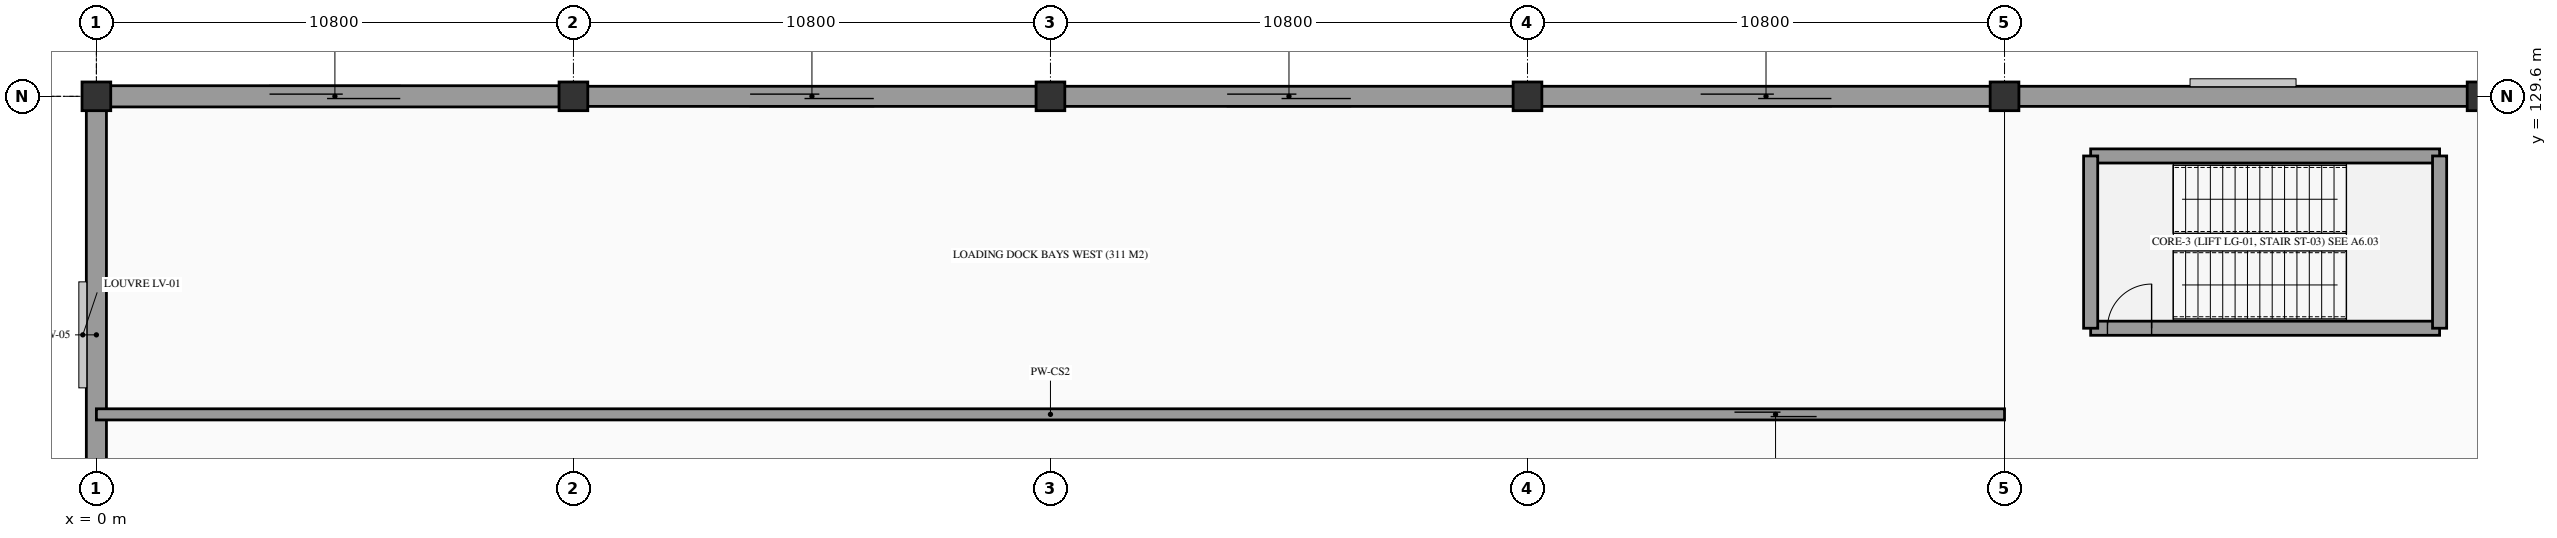
"""IFC4 building model, lengths in metres.
Left out: names, types, materials, properties, quantities, classifications, styles, units other than length and angle.
Written with IfcOpenShell. Run it as: python <this file> out.ifc"""

import sys

from ifc_helpers import new_model, si_unit, direction, frame, frame_2d, origin, origin_2d, place, context, subcontext, project, spatial, rectangle, extrude, element, fill, save


model = new_model("IFC4")
c1 = context("Model", 3, precision=1e-05, world=origin(), true_north=direction((0.0, 1.0)))
c2 = subcontext(c1, "Body", "Model", "MODEL_VIEW")
j1 = project(units=[si_unit("LENGTHUNIT", "METRE"), si_unit("PLANEANGLEUNIT", "RADIAN")], contexts=[c1])
p1 = place(None, origin())
s1 = spatial("IfcSite", under=j1, at=p1, CompositionType="ELEMENT")
p2 = place(p1, origin())
s2 = spatial("IfcBuilding", under=s1, at=p2, CompositionType="ELEMENT")
p3 = place(p2, origin())
s3 = spatial("IfcBuildingStorey", under=s2, at=p3, CompositionType="ELEMENT", Elevation=0.0)
for number, where, z_axis, x_axis in (
    (1, (0.0, 129.6, -1.2), (0.0, 0.0, 1.0), (1.0, 0.0, 0.0)),
    (2, (10.8, 129.6, -1.2), (0.0, 0.0, 1.0), (1.0, 0.0, 0.0)),
    (3, (21.6, 129.6, -1.2), (0.0, 0.0, 1.0), (1.0, 0.0, 0.0)),
    (4, (32.4, 129.6, -1.2), (0.0, 0.0, 1.0), (1.0, 0.0, 0.0)),
    (5, (43.2, 129.6, -1.2), (0.0, 0.0, 1.0), (1.0, 0.0, 0.0)),
    (6, (54.0, 129.6, -1.2), (0.0, 0.0, 1.0), (1.0, 0.0, 0.0)),
):
    element("IfcColumn", number, at=place(p3, frame(where, z_axis=z_axis, x_axis=x_axis)), inside=s3, PredefinedType="COLUMN", context=c2, shape_type="SweptSolid", body=[
        extrude(rectangle(XDim=0.65, YDim=0.65, at=origin_2d()), origin(), (0.0, 0.0, 1.0), 6.6),
    ])
p4 = place(p3, frame((0.0, 0.45, -1.2), z_axis=(0.0, 0.0, 1.0), x_axis=(0.0, 1.0, 0.0)))
e7 = element("IfcWall", 7, at=p4, inside=s3, PredefinedType="USERDEFINED", context=c2, shape_type="SweptSolid", body=[
    extrude(rectangle(XDim=128.7, YDim=0.374, at=frame_2d((64.35, 0.0))), origin(), (0.0, 0.0, 1.0), 0.14),
])
p5 = place(p3, frame((0.32, 129.6, 0.0), z_axis=(0.0, 0.0, 1.0), x_axis=(1.0, 0.0, 0.0)))
e8 = element("IfcWall", 8, at=p5, inside=s3, PredefinedType="STANDARD", context=c2, shape_type="SweptSolid", body=[
    extrude(rectangle(XDim=10.16, YDim=0.48, at=frame_2d((5.08, 0.0))), origin(), (0.0, 0.0, 1.0), 4.25),
])
p6 = place(p5, frame((3.6, 0.0, 0.0)))
e9 = element("IfcOpeningElement", 9, at=p6, cuts=e8, PredefinedType="OPENING", context=c2, shape_type="SweptSolid", body=[
    extrude(rectangle(XDim=2.96, YDim=3.35, at=frame_2d((1.48, 1.675))), frame((0.0, 0.25, 0.0), z_axis=(0.0, -1.0, 0.0), x_axis=(1.0, 0.0, 0.0)), (0.0, 0.0, 1.0), 0.5),
])
p7 = place(p3, frame((0.0, 119.12, 0.0), z_axis=(0.0, 0.0, 1.0), x_axis=(0.0, 1.0, 0.0)))
e10 = element("IfcWall", 10, at=p7, inside=s3, PredefinedType="STANDARD", context=c2, shape_type="SweptSolid", body=[
    extrude(rectangle(XDim=10.16, YDim=0.455, at=frame_2d((5.08, 0.0))), origin(), (0.0, 0.0, 1.0), 4.25),
])
p8 = place(p3, frame((11.12, 129.6, 0.0), z_axis=(0.0, 0.0, 1.0), x_axis=(1.0, 0.0, 0.0)))
e11 = element("IfcWall", 11, at=p8, inside=s3, PredefinedType="STANDARD", context=c2, shape_type="SweptSolid", body=[
    extrude(rectangle(XDim=10.16, YDim=0.455, at=frame_2d((5.08, 0.0))), origin(), (0.0, 0.0, 1.0), 4.25),
])
p9 = place(p8, frame((3.68, 0.0, 0.0)))
e12 = element("IfcOpeningElement", 12, at=p9, cuts=e11, PredefinedType="OPENING", context=c2, shape_type="SweptSolid", body=[
    extrude(rectangle(XDim=2.8, YDim=3.2, at=frame_2d((1.4, 1.6))), frame((0.0, 0.238, 0.0), z_axis=(0.0, -1.0, 0.0), x_axis=(1.0, 0.0, 0.0)), (0.0, 0.0, 1.0), 0.475),
])
p10 = place(p3, frame((21.92, 129.6, 0.0), z_axis=(0.0, 0.0, 1.0), x_axis=(1.0, 0.0, 0.0)))
e13 = element("IfcWall", 13, at=p10, inside=s3, PredefinedType="STANDARD", context=c2, shape_type="SweptSolid", body=[
    extrude(rectangle(XDim=10.16, YDim=0.455, at=frame_2d((5.08, 0.0))), origin(), (0.0, 0.0, 1.0), 4.25),
])
p11 = place(p10, frame((3.68, 0.0, 0.0)))
e14 = element("IfcOpeningElement", 14, at=p11, cuts=e13, PredefinedType="OPENING", context=c2, shape_type="SweptSolid", body=[
    extrude(rectangle(XDim=2.8, YDim=3.2, at=frame_2d((1.4, 1.6))), frame((0.0, 0.238, 0.0), z_axis=(0.0, -1.0, 0.0), x_axis=(1.0, 0.0, 0.0)), (0.0, 0.0, 1.0), 0.475),
])
p12 = place(p3, frame((32.72, 129.6, 0.0), z_axis=(0.0, 0.0, 1.0), x_axis=(1.0, 0.0, 0.0)))
e15 = element("IfcWall", 15, at=p12, inside=s3, PredefinedType="STANDARD", context=c2, shape_type="SweptSolid", body=[
    extrude(rectangle(XDim=10.16, YDim=0.455, at=frame_2d((5.08, 0.0))), origin(), (0.0, 0.0, 1.0), 4.25),
])
p13 = place(p12, frame((3.6, 0.0, 0.0)))
e16 = element("IfcOpeningElement", 16, at=p13, cuts=e15, PredefinedType="OPENING", context=c2, shape_type="SweptSolid", body=[
    extrude(rectangle(XDim=2.96, YDim=3.35, at=frame_2d((1.48, 1.675))), frame((0.0, 0.238, 0.0), z_axis=(0.0, -1.0, 0.0), x_axis=(1.0, 0.0, 0.0)), (0.0, 0.0, 1.0), 0.475),
])
p14 = place(p3, frame((43.52, 129.6, 0.0), z_axis=(0.0, 0.0, 1.0), x_axis=(1.0, 0.0, 0.0)))
e17 = element("IfcWall", 17, at=p14, inside=s3, PredefinedType="STANDARD", context=c2, shape_type="SweptSolid", body=[
    extrude(rectangle(XDim=10.16, YDim=0.455, at=frame_2d((5.08, 0.0))), origin(), (0.0, 0.0, 1.0), 4.25),
])
p15 = place(p3, frame((45.15, 124.35, 0.0), z_axis=(0.0, 0.0, 1.0), x_axis=(1.0, 0.0, 0.0)))
e18 = element("IfcWall", 18, at=p15, inside=s3, PredefinedType="SHEAR", context=c2, shape_type="SweptSolid", body=[
    extrude(rectangle(XDim=7.9, YDim=0.32, at=frame_2d((3.95, 0.0))), origin(), (0.0, 0.0, 1.0), 5.4),
])
p16 = place(p15, frame((0.38, 0.0, 0.0)))
e19 = element("IfcOpeningElement", 19, at=p16, cuts=e18, PredefinedType="OPENING", context=c2, shape_type="SweptSolid", body=[
    extrude(rectangle(XDim=1.0, YDim=2.15, at=frame_2d((0.5, 1.075))), frame((0.0, 0.17, 0.0), z_axis=(0.0, -1.0, 0.0), x_axis=(1.0, 0.0, 0.0)), (0.0, 0.0, 1.0), 0.34),
])
p17 = place(p3, frame((45.15, 128.25, 0.0), z_axis=(0.0, 0.0, 1.0), x_axis=(1.0, 0.0, 0.0)))
e20 = element("IfcWall", 20, at=p17, inside=s3, PredefinedType="SHEAR", context=c2, shape_type="SweptSolid", body=[
    extrude(rectangle(XDim=7.9, YDim=0.32, at=frame_2d((3.95, 0.0))), origin(), (0.0, 0.0, 1.0), 5.4),
])
for number, where, z_axis, x_axis in (
    (21, (45.15, 124.35, 0.0), (0.0, 0.0, 1.0), (0.0, 1.0, 0.0)),
    (22, (53.05, 124.35, 0.0), (0.0, 0.0, 1.0), (0.0, 1.0, 0.0)),
):
    element("IfcWall", number, at=place(p3, frame(where, z_axis=z_axis, x_axis=x_axis)), inside=s3, PredefinedType="SHEAR", context=c2, shape_type="SweptSolid", body=[
        extrude(rectangle(XDim=3.9, YDim=0.32, at=frame_2d((1.95, 0.0))), origin(), (0.0, 0.0, 1.0), 5.4),
    ])
p18 = place(p3, frame((0.0, 122.4, 0.0), z_axis=(0.0, 0.0, 1.0), x_axis=(1.0, 0.0, 0.0)))
e23 = element("IfcWall", 23, at=p18, inside=s3, PredefinedType="PARTITIONING", context=c2, shape_type="SweptSolid", body=[
    extrude(rectangle(XDim=43.2, YDim=0.252, at=frame_2d((21.6, 0.0))), origin(), (0.0, 0.0, 1.0), 3.95),
])
p19 = place(p18, frame((37.086, 0.0, 0.0)))
e24 = element("IfcOpeningElement", 24, at=p19, cuts=e23, PredefinedType="OPENING", context=c2, shape_type="SweptSolid", body=[
    extrude(rectangle(XDim=1.86, YDim=2.5, at=frame_2d((0.93, 1.25))), frame((0.0, 0.136, 0.0), z_axis=(0.0, -1.0, 0.0), x_axis=(1.0, 0.0, 0.0)), (0.0, 0.0, 1.0), 0.272),
])
p20 = place(p6, origin())
e25 = element("IfcDoor", 25, at=p20, inside=s3, OperationType="ROLLINGUP", PredefinedType="USERDEFINED", context=c2, shape_type="SweptSolid", body=[
    extrude(rectangle(XDim=2.96, YDim=3.35, at=frame_2d((1.48, 1.675))), frame((0.0, 0.025, 0.0), z_axis=(0.0, -1.0, 0.0), x_axis=(1.0, 0.0, 0.0)), (0.0, 0.0, 1.0), 0.05),
])
fill(e9, e25)
p21 = place(p9, origin())
e26 = element("IfcDoor", 26, at=p21, inside=s3, OperationType="ROLLINGUP", PredefinedType="USERDEFINED", context=c2, shape_type="SweptSolid", body=[
    extrude(rectangle(XDim=2.8, YDim=3.2, at=frame_2d((1.4, 1.6))), frame((0.0, 0.025, 0.0), z_axis=(0.0, -1.0, 0.0), x_axis=(1.0, 0.0, 0.0)), (0.0, 0.0, 1.0), 0.05),
])
fill(e12, e26)
p22 = place(p11, origin())
e27 = element("IfcDoor", 27, at=p22, inside=s3, OperationType="ROLLINGUP", PredefinedType="USERDEFINED", context=c2, shape_type="SweptSolid", body=[
    extrude(rectangle(XDim=2.8, YDim=3.2, at=frame_2d((1.4, 1.6))), frame((0.0, 0.025, 0.0), z_axis=(0.0, -1.0, 0.0), x_axis=(1.0, 0.0, 0.0)), (0.0, 0.0, 1.0), 0.05),
])
fill(e14, e27)
p23 = place(p13, origin())
e28 = element("IfcDoor", 28, at=p23, inside=s3, OperationType="ROLLINGUP", PredefinedType="USERDEFINED", context=c2, shape_type="SweptSolid", body=[
    extrude(rectangle(XDim=2.96, YDim=3.35, at=frame_2d((1.48, 1.675))), frame((0.0, 0.025, 0.0), z_axis=(0.0, -1.0, 0.0), x_axis=(1.0, 0.0, 0.0)), (0.0, 0.0, 1.0), 0.05),
])
fill(e16, e28)
p24 = place(p16, origin())
e29 = element("IfcDoor", 29, at=p24, inside=s3, OperationType="SINGLE_SWING_RIGHT", PredefinedType="DOOR", context=c2, shape_type="SweptSolid", body=[
    extrude(rectangle(XDim=1.0, YDim=2.15, at=frame_2d((0.5, 1.075))), frame((0.0, 0.025, 0.0), z_axis=(0.0, -1.0, 0.0), x_axis=(1.0, 0.0, 0.0)), (0.0, 0.0, 1.0), 0.05),
])
fill(e19, e29)
p25 = place(p19, origin())
e30 = element("IfcDoor", 30, at=p25, inside=s3, OperationType="SLIDING_TO_LEFT", PredefinedType="DOOR", context=c2, shape_type="SweptSolid", body=[
    extrude(rectangle(XDim=1.86, YDim=2.5, at=frame_2d((0.93, 1.25))), frame((0.0, 0.025, 0.0), z_axis=(0.0, -1.0, 0.0), x_axis=(1.0, 0.0, 0.0)), (0.0, 0.0, 1.0), 0.05),
])
fill(e24, e30)
save(model, sys.argv[1])
